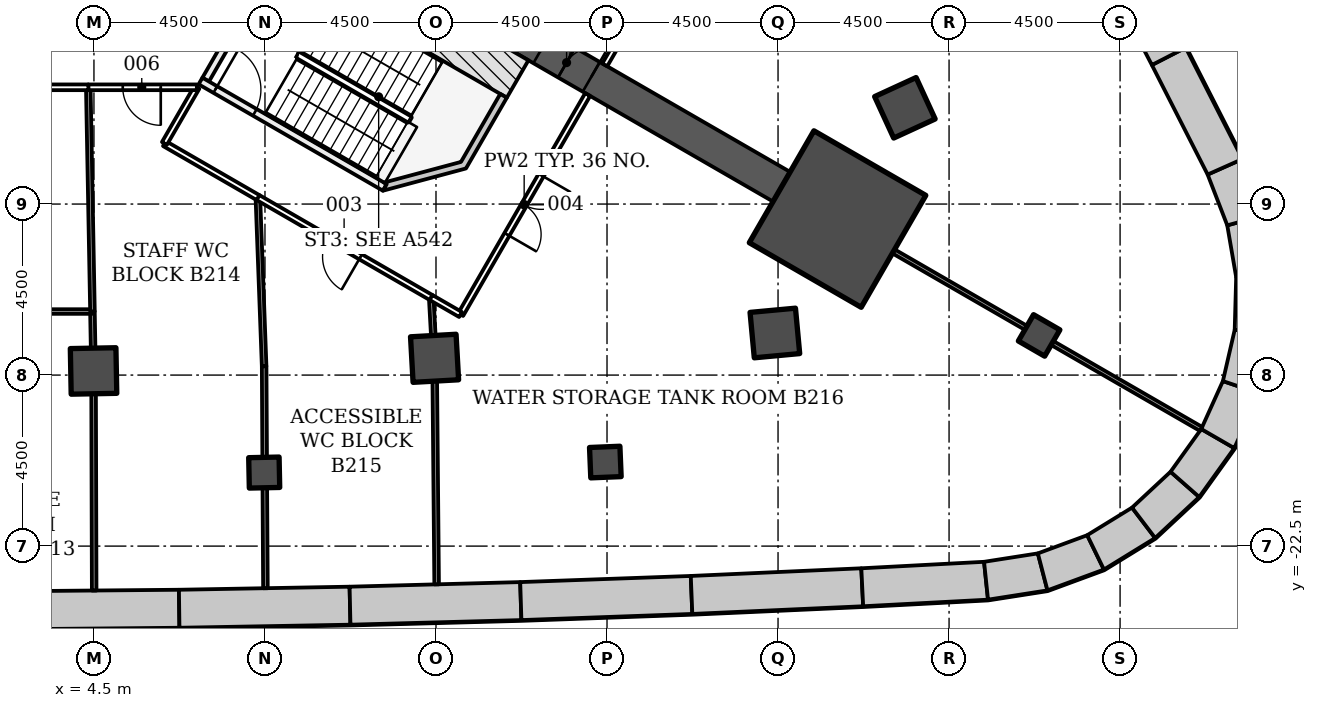
"""IFC4 building model, lengths in metres.
Left out: names, types, materials, properties, quantities, classifications, styles, units other than length and angle.
Written with IfcOpenShell. Run it as: python <this file> out.ifc"""

import sys

from ifc_helpers import new_model, si_unit, direction, frame, frame_2d, origin, origin_2d, place, context, subcontext, project, spatial, polyline, rectangle, outline, extrude, element, fill, save


model = new_model("IFC4")
c1 = context("Model", 3, precision=1e-05, world=origin(), true_north=direction((0.0, 1.0)))
c2 = subcontext(c1, "Body", "Model", "MODEL_VIEW")
j1 = project(units=[si_unit("LENGTHUNIT", "METRE"), si_unit("PLANEANGLEUNIT", "RADIAN")], contexts=[c1])
p1 = place(None, origin())
s1 = spatial("IfcSite", under=j1, at=p1, CompositionType="ELEMENT")
p2 = place(p1, origin())
s2 = spatial("IfcBuilding", under=s1, at=p2, CompositionType="ELEMENT")
p3 = place(p2, frame((0.0, 0.0, -9.0)))
s3 = spatial("IfcBuildingStorey", under=s2, at=p3, CompositionType="ELEMENT", Elevation=-9.0)
p4 = place(p3, origin())
e1 = element("IfcWall", 1, at=p4, inside=s3, PredefinedType="SOLIDWALL", context=c2, shape_type="SweptSolid", body=[
    extrude(outline(polyline([(2.25, -24.689), (6.75, -24.648), (6.736, -23.649), (2.246, -23.689), (2.25, -24.689)])), origin(), (0.0, 0.0, 1.0), 4.2),
])
p5 = place(p3, origin())
e2 = element("IfcWall", 2, at=p5, inside=s3, PredefinedType="SOLIDWALL", context=c2, shape_type="SweptSolid", body=[
    extrude(outline(polyline([(6.75, -24.648), (11.249, -24.568), (11.227, -23.568), (6.736, -23.649), (6.75, -24.648)])), origin(), (0.0, 0.0, 1.0), 4.2),
])
p6 = place(p3, origin())
e3 = element("IfcWall", 3, at=p6, inside=s3, PredefinedType="SOLIDWALL", context=c2, shape_type="SweptSolid", body=[
    extrude(outline(polyline([(11.249, -24.568), (15.747, -24.446), (15.716, -23.447), (11.227, -23.568), (11.249, -24.568)])), origin(), (0.0, 0.0, 1.0), 4.2),
])
p7 = place(p3, origin())
e4 = element("IfcWall", 4, at=p7, inside=s3, PredefinedType="SOLIDWALL", context=c2, shape_type="SweptSolid", body=[
    extrude(outline(polyline([(15.747, -24.446), (20.244, -24.285), (20.204, -23.285), (15.716, -23.447), (15.747, -24.446)])), origin(), (0.0, 0.0, 1.0), 4.2),
])
p8 = place(p3, origin())
e5 = element("IfcWall", 5, at=p8, inside=s3, PredefinedType="SOLIDWALL", context=c2, shape_type="SweptSolid", body=[
    extrude(outline(polyline([(20.244, -24.285), (24.74, -24.083), (24.691, -23.084), (20.204, -23.285), (20.244, -24.285)])), origin(), (0.0, 0.0, 1.0), 4.2),
])
p9 = place(p3, origin())
e6 = element("IfcWall", 6, at=p9, inside=s3, PredefinedType="SOLIDWALL", context=c2, shape_type="SweptSolid", body=[
    extrude(outline(polyline([(24.74, -24.083), (28.025, -23.909), (27.921, -22.913), (24.691, -23.084), (24.74, -24.083)])), origin(), (0.0, 0.0, 1.0), 4.2),
])
p10 = place(p3, origin())
e7 = element("IfcWall", 7, at=p10, inside=s3, PredefinedType="SOLIDWALL", context=c2, shape_type="SweptSolid", body=[
    extrude(outline(polyline([(28.025, -23.909), (29.589, -23.665), (29.337, -22.692), (27.921, -22.913), (28.025, -23.909)])), origin(), (0.0, 0.0, 1.0), 4.2),
])
p11 = place(p3, origin())
e8 = element("IfcWall", 8, at=p11, inside=s3, PredefinedType="SOLIDWALL", context=c2, shape_type="SweptSolid", body=[
    extrude(outline(polyline([(29.589, -23.665), (31.075, -23.117), (30.635, -22.213), (29.337, -22.692), (29.589, -23.665)])), origin(), (0.0, 0.0, 1.0), 4.2),
])
p12 = place(p3, origin())
e9 = element("IfcWall", 9, at=p12, inside=s3, PredefinedType="SOLIDWALL", context=c2, shape_type="SweptSolid", body=[
    extrude(outline(polyline([(31.075, -23.117), (32.423, -22.287), (31.815, -21.487), (30.635, -22.213), (31.075, -23.117)])), origin(), (0.0, 0.0, 1.0), 4.2),
])
p13 = place(p3, origin())
e10 = element("IfcWall", 10, at=p13, inside=s3, PredefinedType="SOLIDWALL", context=c2, shape_type="SweptSolid", body=[
    extrude(outline(polyline([(32.423, -22.287), (33.582, -21.208), (32.828, -20.544), (31.815, -21.487), (32.423, -22.287)])), origin(), (0.0, 0.0, 1.0), 4.2),
])
p14 = place(p3, origin())
e11 = element("IfcWall", 11, at=p14, inside=s3, PredefinedType="SOLIDWALL", context=c2, shape_type="SweptSolid", body=[
    extrude(outline(polyline([(33.582, -21.208), (34.506, -19.922), (33.635, -19.419), (32.828, -20.544), (33.582, -21.208)])), origin(), (0.0, 0.0, 1.0), 4.2),
])
p15 = place(p3, origin())
e12 = element("IfcWall", 12, at=p15, inside=s3, PredefinedType="SOLIDWALL", context=c2, shape_type="SweptSolid", body=[
    extrude(outline(polyline([(34.506, -19.922), (35.158, -18.479), (34.205, -18.158), (33.635, -19.419), (34.506, -19.922)])), origin(), (0.0, 0.0, 1.0), 4.2),
])
p16 = place(p3, origin())
e13 = element("IfcWall", 13, at=p16, inside=s3, PredefinedType="SOLIDWALL", context=c2, shape_type="SweptSolid", body=[
    extrude(outline(polyline([(35.158, -18.479), (35.513, -16.936), (34.516, -16.809), (34.205, -18.158), (35.158, -18.479)])), origin(), (0.0, 0.0, 1.0), 4.2),
])
p17 = place(p3, origin())
e14 = element("IfcWall", 14, at=p17, inside=s3, PredefinedType="SOLIDWALL", context=c2, shape_type="SweptSolid", body=[
    extrude(outline(polyline([(35.513, -16.936), (35.557, -15.353), (34.555, -15.425), (34.516, -16.809), (35.513, -16.936)])), origin(), (0.0, 0.0, 1.0), 4.2),
])
p18 = place(p3, origin())
e15 = element("IfcWall", 15, at=p18, inside=s3, PredefinedType="SOLIDWALL", context=c2, shape_type="SweptSolid", body=[
    extrude(outline(polyline([(35.557, -15.353), (35.289, -13.793), (34.32, -14.06), (34.555, -15.425), (35.557, -15.353)])), origin(), (0.0, 0.0, 1.0), 4.2),
])
p19 = place(p3, origin())
e16 = element("IfcWall", 16, at=p19, inside=s3, PredefinedType="SOLIDWALL", context=c2, shape_type="SweptSolid", body=[
    extrude(outline(polyline([(35.289, -13.793), (34.719, -12.316), (33.804, -12.724), (34.32, -14.06), (35.289, -13.793)])), origin(), (0.0, 0.0, 1.0), 4.2),
])
p20 = place(p3, origin())
e17 = element("IfcWall", 17, at=p20, inside=s3, PredefinedType="SOLIDWALL", context=c2, shape_type="SweptSolid", body=[
    extrude(outline(polyline([(34.719, -12.316), (33.226, -9.384), (32.337, -9.841), (33.804, -12.724), (34.719, -12.316)])), origin(), (0.0, 0.0, 1.0), 4.2),
])
p21 = place(p3, origin())
e18 = element("IfcWall", 18, at=p21, inside=s3, PredefinedType="SOLIDWALL", context=c2, shape_type="SweptSolid", body=[
    extrude(outline(polyline([(33.226, -9.384), (31.153, -5.39), (30.268, -5.854), (32.337, -9.841), (33.226, -9.384)])), origin(), (0.0, 0.0, 1.0), 4.2),
])
for number, where, z_axis, x_axis in (
    (19, (4.49, -17.892, -0.3), (0.0, 0.0, 1.0), (0.019, -1.0, 0.0)),
    (20, (13.462, -17.558, -0.3), (0.0, 0.0, 1.0), (0.056, -0.998, 0.0)),
    (21, (22.417, -16.893, -0.3), (0.0, 0.0, 1.0), (0.093, -0.996, 0.0)),
    (22, (25.838, -10.967, -0.3), (0.0, 0.0, 1.0), (0.909, 0.418, 0.0)),
):
    element("IfcColumn", number, at=place(p3, frame(where, z_axis=z_axis, x_axis=x_axis)), inside=s3, PredefinedType="COLUMN", context=c2, shape_type="SweptSolid", body=[
        extrude(rectangle(XDim=1.2, YDim=1.2, at=origin_2d()), origin(), (0.0, 0.0, 1.0), 4.5),
    ])
for number, where, z_axis, x_axis in (
    (23, (8.98, -20.565, -0.3), (0.0, 0.0, 1.0), (0.021, -1.0, 0.0)),
    (24, (17.956, -20.288, -0.3), (0.0, 0.0, 1.0), (0.041, -0.999, 0.0)),
    (25, (29.37, -16.957, -0.3), (0.0, 0.0, 1.0), (0.866, -0.5, 0.0)),
):
    element("IfcColumn", number, at=place(p3, frame(where, z_axis=z_axis, x_axis=x_axis)), inside=s3, PredefinedType="COLUMN", context=c2, shape_type="SweptSolid", body=[
        extrude(rectangle(XDim=0.8, YDim=0.8, at=origin_2d()), origin(), (0.0, 0.0, 1.0), 4.5),
    ])
p22 = place(p3, frame((9.922, -5.728, -0.3), z_axis=(0.0, 0.0, 1.0), x_axis=(0.866028046028, -0.499995423472, 0.0)))
e26 = element("IfcWall", 26, at=p22, inside=s3, PredefinedType="SHEAR", context=c2, shape_type="SweptSolid", body=[
    extrude(rectangle(XDim=14.633, YDim=0.9, at=frame_2d((7.316, 0.0))), origin(), (0.0, 0.0, 1.0), 4.5),
])
p23 = place(p22, frame((7.35, 0.0, 0.3)))
e27 = element("IfcOpeningElement", 27, at=p23, cuts=e26, PredefinedType="OPENING", context=c2, shape_type="SweptSolid", body=[
    extrude(rectangle(XDim=1.5, YDim=2.1, at=frame_2d((0.75, 1.05))), frame((0.0, 0.46, 0.0), z_axis=(0.0, -1.0, 0.0), x_axis=(1.0, 0.0, 0.0)), (0.0, 0.0, 1.0), 0.92),
])
p24 = place(p3, frame((24.066, -13.895, -0.3), z_axis=(0.0, 0.0, 1.0), x_axis=(0.866025403784, -0.5, 0.0)))
e28 = element("IfcColumn", 28, at=p24, inside=s3, PredefinedType="COLUMN", context=c2, shape_type="SweptSolid", body=[
    extrude(rectangle(XDim=3.4, YDim=3.4, at=origin_2d()), origin(), (0.0, 0.0, 1.0), 4.5),
])
p25 = place(p3, frame((7.44, -10.226, -0.3), z_axis=(0.0, 0.0, 1.0), x_axis=(0.500022077904, 0.866012656725, 0.0)))
e29 = element("IfcWall", 29, at=p25, inside=s3, PredefinedType="SHEAR", context=c2, shape_type="SweptSolid", body=[
    extrude(rectangle(XDim=3.55, YDim=0.2, at=frame_2d((1.775, 0.0))), origin(), (0.0, 0.0, 1.0), 4.5),
])
p26 = place(p25, frame((1.175, 0.0, 0.3)))
e30 = element("IfcOpeningElement", 30, at=p26, cuts=e29, PredefinedType="OPENING", context=c2, shape_type="SweptSolid", body=[
    extrude(rectangle(XDim=1.2, YDim=2.1, at=frame_2d((0.6, 1.05))), frame((0.0, 0.11, 0.0), z_axis=(0.0, -1.0, 0.0), x_axis=(1.0, 0.0, 0.0)), (0.0, 0.0, 1.0), 0.22),
])
p27 = place(p3, frame((7.304, -10.262, -0.3), z_axis=(0.0, 0.0, 1.0), x_axis=(0.866026594901, -0.49999793692, 0.0)))
e31 = element("IfcWall", 31, at=p27, inside=s3, PredefinedType="SHEAR", context=c2, shape_type="SweptSolid", body=[
    extrude(rectangle(XDim=5.6, YDim=0.2, at=frame_2d((2.8, 0.0))), origin(), (0.0, 0.0, 1.0), 4.5),
])
p28 = place(p27, frame((0.45, 0.0, 0.3)))
e32 = element("IfcOpeningElement", 32, at=p28, cuts=e31, PredefinedType="OPENING", context=c2, shape_type="SweptSolid", body=[
    extrude(rectangle(XDim=1.2, YDim=2.1, at=frame_2d((0.6, 1.05))), frame((0.0, 0.11, 0.0), z_axis=(0.0, -1.0, 0.0), x_axis=(1.0, 0.0, 0.0)), (0.0, 0.0, 1.0), 0.22),
])
p29 = place(p3, frame((9.413, -6.61, -0.3), z_axis=(0.0, 0.0, 1.0), x_axis=(0.866018442252, -0.500012057535, 0.0)))
e33 = element("IfcWall", 33, at=p29, inside=s3, PredefinedType="SHEAR", context=c2, shape_type="SweptSolid", body=[
    extrude(rectangle(XDim=7.2, YDim=1.136, at=frame_2d((3.6, 0.0))), origin(), (0.0, 0.0, 1.0), 4.5),
])
p30 = place(p3, frame((0.0, 0.0, -0.3)))
e34 = element("IfcWall", 34, at=p30, inside=s3, PredefinedType="SHEAR", context=c2, shape_type="SweptSolid", body=[
    extrude(outline(polyline([(12.104, -13.149), (14.289, -12.563), (15.364, -10.701), (15.191, -10.601), (14.157, -12.392), (12.132, -12.934), (12.204, -12.976), (12.204, -12.976), (12.204, -12.976), (12.204, -12.976), (12.204, -12.976), (12.204, -12.976), (12.204, -12.976), (12.204, -12.976), (12.204, -12.976), (12.204, -12.976), (12.204, -12.976), (12.204, -12.976), (12.204, -12.976), (12.204, -12.976), (12.204, -12.976), (12.204, -12.976), (12.204, -12.976), (12.104, -13.149)])), origin(), (0.0, 0.0, 1.0), 4.5),
])
p31 = place(p3, frame((4.478, -17.291, 0.0), z_axis=(0.0, 0.0, 1.0), x_axis=(-0.018678891577, 0.999825534286, 0.0)))
e35 = element("IfcWall", 35, at=p31, inside=s3, PredefinedType="PARTITIONING", context=c2, shape_type="SweptSolid", body=[
    extrude(rectangle(XDim=0.967, YDim=0.12, at=frame_2d((0.484, 0.0))), origin(), (0.0, 0.0, 1.0), 3.588),
])
p32 = place(p3, frame((4.506, -23.669, 0.0), z_axis=(0.0, 0.0, 1.0), x_axis=(-0.00292382622, 0.999995725611, 0.0)))
e36 = element("IfcWall", 36, at=p32, inside=s3, PredefinedType="PARTITIONING", context=c2, shape_type="SweptSolid", body=[
    extrude(rectangle(XDim=5.177, YDim=0.12, at=frame_2d((2.588, 0.0))), origin(), (0.0, 0.0, 1.0), 3.583),
])
p33 = place(p3, frame((4.461, -16.328, 0.0), z_axis=(0.0, 0.0, 1.0), x_axis=(-1.0, 0.0, 0.0)))
e37 = element("IfcWall", 37, at=p33, inside=s3, PredefinedType="PARTITIONING", context=c2, shape_type="SweptSolid", body=[
    extrude(rectangle(XDim=4.461, YDim=0.12, at=frame_2d((2.23, 0.0))), origin(), (0.0, 0.0, 1.0), 3.588),
])
p34 = place(p33, frame((1.75, 0.0, 0.0)))
e38 = element("IfcOpeningElement", 38, at=p34, cuts=e37, PredefinedType="OPENING", context=c2, shape_type="SweptSolid", body=[
    extrude(rectangle(XDim=1.0, YDim=2.1, at=frame_2d((0.5, 1.05))), frame((0.0, 0.07, 0.0), z_axis=(0.0, -1.0, 0.0), x_axis=(1.0, 0.0, 0.0)), (0.0, 0.0, 1.0), 0.14),
])
p35 = place(p3, frame((13.429, -16.959, 0.0), z_axis=(0.0, 0.0, 1.0), x_axis=(-0.055009625476, 0.998485824188, 0.0)))
e39 = element("IfcWall", 39, at=p35, inside=s3, PredefinedType="PARTITIONING", context=c2, shape_type="SweptSolid", body=[
    extrude(rectangle(XDim=0.999, YDim=0.12, at=frame_2d((0.499, 0.0))), origin(), (0.0, 0.0, 1.0), 3.588),
])
p36 = place(p3, frame((13.517, -23.506, 0.0), z_axis=(0.0, 0.0, 1.0), x_axis=(-0.00917685765, 0.999957891755, 0.0)))
e40 = element("IfcWall", 40, at=p36, inside=s3, PredefinedType="PARTITIONING", context=c2, shape_type="SweptSolid", body=[
    extrude(rectangle(XDim=5.347, YDim=0.12, at=frame_2d((2.674, 0.0))), origin(), (0.0, 0.0, 1.0), 3.583),
])
p37 = place(p3, frame((8.813, -13.328, 0.0), z_axis=(0.0, 0.0, 1.0), x_axis=(0.03715191714, -0.999309629221, 0.0)))
e41 = element("IfcWall", 41, at=p37, inside=s3, PredefinedType="PARTITIONING", context=c2, shape_type="SweptSolid", body=[
    extrude(rectangle(XDim=4.442, YDim=0.12, at=frame_2d((2.221, 0.0))), origin(), (0.0, 0.0, 1.0), 3.588),
])
p38 = place(p3, frame((8.978, -17.767, 0.0), z_axis=(0.0, 0.0, 1.0), x_axis=(0.005803200997, -0.999983161287, 0.0)))
e42 = element("IfcWall", 42, at=p38, inside=s3, PredefinedType="PARTITIONING", context=c2, shape_type="SweptSolid", body=[
    extrude(rectangle(XDim=2.398, YDim=0.12, at=frame_2d((1.199, 0.0))), origin(), (0.0, 0.0, 1.0), 3.588),
])
p39 = place(p3, frame((8.996, -20.965, 0.0), z_axis=(0.0, 0.0, 1.0), x_axis=(0.006004510691, -0.999981972763, 0.0)))
e43 = element("IfcWall", 43, at=p39, inside=s3, PredefinedType="PARTITIONING", context=c2, shape_type="SweptSolid", body=[
    extrude(rectangle(XDim=2.643, YDim=0.12, at=frame_2d((1.321, 0.0))), origin(), (0.0, 0.0, 1.0), 4.2),
])
p40 = place(p3, frame((13.377, -15.963, 0.0), z_axis=(0.0, 0.0, 1.0), x_axis=(-0.865969754012, 0.500096375847, 0.0)))
e44 = element("IfcWall", 44, at=p40, inside=s3, PredefinedType="PARTITIONING", context=c2, shape_type="SweptSolid", body=[
    extrude(rectangle(XDim=5.275, YDim=0.15, at=frame_2d((2.637, 0.0))), origin(), (0.0, 0.0, 1.0), 3.588),
])
p41 = place(p40, frame((2.15, 0.0, 0.0)))
e45 = element("IfcOpeningElement", 45, at=p41, cuts=e44, PredefinedType="OPENING", context=c2, shape_type="SweptSolid", body=[
    extrude(rectangle(XDim=1.0, YDim=2.1, at=frame_2d((0.5, 1.05))), frame((0.0, 0.085, 0.0), z_axis=(0.0, -1.0, 0.0), x_axis=(1.0, 0.0, 0.0)), (0.0, 0.0, 1.0), 0.17),
])
p42 = place(p3, frame((17.491, -10.618, 0.0), z_axis=(0.0, 0.0, 1.0), x_axis=(-0.499969057507, -0.866043267704, 0.0)))
e46 = element("IfcWall", 46, at=p42, inside=s3, PredefinedType="PARTITIONING", context=c2, shape_type="SweptSolid", body=[
    extrude(rectangle(XDim=6.685, YDim=0.15, at=frame_2d((3.342, 0.0))), origin(), (0.0, 0.0, 1.0), 3.588),
])
p43 = place(p42, frame((2.45, 0.0, 0.0)))
e47 = element("IfcOpeningElement", 47, at=p43, cuts=e46, PredefinedType="OPENING", context=c2, shape_type="SweptSolid", body=[
    extrude(rectangle(XDim=1.8, YDim=2.1, at=frame_2d((0.9, 1.05))), frame((0.0, 0.085, 0.0), z_axis=(0.0, -1.0, 0.0), x_axis=(1.0, 0.0, 0.0)), (0.0, 0.0, 1.0), 0.17),
])
p44 = place(p3, frame((14.147, -16.407, 0.0), z_axis=(0.0, 0.0, 1.0), x_axis=(-0.866276218641, 0.499565324075, 0.0)))
e48 = element("IfcWall", 48, at=p44, inside=s3, PredefinedType="PARTITIONING", context=c2, shape_type="SweptSolid", body=[
    extrude(rectangle(XDim=0.897, YDim=0.15, at=frame_2d((0.448, 0.0))), origin(), (0.0, 0.0, 1.0), 3.588),
])
p45 = place(p3, frame((29.023, -16.757, 0.0), z_axis=(0.0, 0.0, 1.0), x_axis=(-0.866027971625, 0.499995552344, 0.0)))
e49 = element("IfcWall", 49, at=p45, inside=s3, PredefinedType="PARTITIONING", context=c2, shape_type="SweptSolid", body=[
    extrude(rectangle(XDim=4.024, YDim=0.12, at=frame_2d((2.012, 0.0))), origin(), (0.0, 0.0, 1.0), 3.667),
])
p46 = place(p3, frame((33.634, -19.419, 0.0), z_axis=(0.0, 0.0, 1.0), x_axis=(-0.866032814021, 0.499987164874, 0.0)))
e50 = element("IfcWall", 50, at=p46, inside=s3, PredefinedType="PARTITIONING", context=c2, shape_type="SweptSolid", body=[
    extrude(rectangle(XDim=4.524, YDim=0.12, at=frame_2d((2.262, 0.0))), origin(), (0.0, 0.0, 1.0), 4.2),
])
p47 = place(p3, frame((4.351, -10.429, 0.0), z_axis=(0.0, 0.0, 1.0), x_axis=(0.018624139004, -0.999826555682, 0.0)))
e51 = element("IfcWall", 51, at=p47, inside=s3, PredefinedType="PARTITIONING", context=c2, shape_type="SweptSolid", body=[
    extrude(rectangle(XDim=5.899, YDim=0.12, at=frame_2d((2.949, 0.0))), origin(), (0.0, 0.0, 1.0), 3.588),
])
p48 = place(p3, frame((8.817, -13.33, 0.0), z_axis=(0.0, 0.0, 1.0), x_axis=(-0.865999736111, 0.50004445508, 0.0)))
e52 = element("IfcWall", 52, at=p48, inside=s3, PredefinedType="PARTITIONING", context=c2, shape_type="SweptSolid", body=[
    extrude(rectangle(XDim=2.844, YDim=0.15, at=frame_2d((1.422, 0.0))), origin(), (0.0, 0.0, 1.0), 3.588),
])
p49 = place(p3, frame((6.354, -11.906, 0.0), z_axis=(0.0, 0.0, 1.0), x_axis=(0.500539815233, 0.865713516913, 0.0)))
e53 = element("IfcWall", 53, at=p49, inside=s3, PredefinedType="PARTITIONING", context=c2, shape_type="SweptSolid", body=[
    extrude(rectangle(XDim=1.706, YDim=0.15, at=frame_2d((0.853, 0.0))), origin(), (0.0, 0.0, 1.0), 4.2),
])
p50 = place(p3, frame((7.208, -10.428, 0.0), z_axis=(0.0, 0.0, 1.0), x_axis=(-1.0, 0.0, 0.0)))
e54 = element("IfcWall", 54, at=p50, inside=s3, PredefinedType="PARTITIONING", context=c2, shape_type="SweptSolid", body=[
    extrude(rectangle(XDim=2.861, YDim=0.15, at=frame_2d((1.431, 0.0))), origin(), (0.0, 0.0, 1.0), 3.588),
])
p51 = place(p50, frame((0.95, 0.0, 0.0)))
e55 = element("IfcOpeningElement", 55, at=p51, cuts=e54, PredefinedType="OPENING", context=c2, shape_type="SweptSolid", body=[
    extrude(rectangle(XDim=1.0, YDim=2.1, at=frame_2d((0.5, 1.05))), frame((0.0, 0.085, 0.0), z_axis=(0.0, -1.0, 0.0), x_axis=(1.0, 0.0, 0.0)), (0.0, 0.0, 1.0), 0.17),
])
p52 = place(p3, frame((4.355, -10.428, 0.0), z_axis=(0.0, 0.0, 1.0), x_axis=(-1.0, 0.0, 0.0)))
e56 = element("IfcWall", 56, at=p52, inside=s3, PredefinedType="PARTITIONING", context=c2, shape_type="SweptSolid", body=[
    extrude(rectangle(XDim=4.359, YDim=0.15, at=frame_2d((2.179, 0.0))), origin(), (0.0, 0.0, 1.0), 3.588),
])
p53 = place(p52, frame((1.65, 0.0, 0.0)))
e57 = element("IfcOpeningElement", 57, at=p53, cuts=e56, PredefinedType="OPENING", context=c2, shape_type="SweptSolid", body=[
    extrude(rectangle(XDim=1.0, YDim=2.1, at=frame_2d((0.5, 1.05))), frame((0.0, 0.085, 0.0), z_axis=(0.0, -1.0, 0.0), x_axis=(1.0, 0.0, 0.0)), (0.0, 0.0, 1.0), 0.17),
])
p54 = place(p3, frame((18.84, -8.281, 0.0), z_axis=(0.0, 0.0, 1.0), x_axis=(-0.500126010714, -0.86595263924, 0.0)))
e58 = element("IfcWall", 58, at=p54, inside=s3, PredefinedType="PARTITIONING", context=c2, shape_type="SweptSolid", body=[
    extrude(rectangle(XDim=1.798, YDim=0.15, at=frame_2d((0.899, 0.0))), origin(), (0.0, 0.0, 1.0), 3.588),
])
p55 = place(p28, origin())
e59 = element("IfcDoor", 59, at=p55, inside=s3, OperationType="SINGLE_SWING_LEFT", PredefinedType="DOOR", context=c2, shape_type="SweptSolid", body=[
    extrude(rectangle(XDim=1.2, YDim=2.1, at=frame_2d((0.6, 1.05))), frame((0.0, 0.025, 0.0), z_axis=(0.0, -1.0, 0.0), x_axis=(1.0, 0.0, 0.0)), (0.0, 0.0, 1.0), 0.05),
])
fill(e32, e59)
p56 = place(p41, origin())
e60 = element("IfcDoor", 60, at=p56, inside=s3, OperationType="SINGLE_SWING_RIGHT", PredefinedType="DOOR", context=c2, shape_type="SweptSolid", body=[
    extrude(rectangle(XDim=1.0, YDim=2.1, at=frame_2d((0.5, 1.05))), frame((0.0, 0.025, 0.0), z_axis=(0.0, -1.0, 0.0), x_axis=(1.0, 0.0, 0.0)), (0.0, 0.0, 1.0), 0.05),
])
fill(e45, e60)
p57 = place(p43, origin())
e61 = element("IfcDoor", 61, at=p57, inside=s3, OperationType="DOUBLE_DOOR_SINGLE_SWING", PredefinedType="DOOR", context=c2, shape_type="SweptSolid", body=[
    extrude(rectangle(XDim=1.8, YDim=2.1, at=frame_2d((0.9, 1.05))), frame((0.0, 0.025, 0.0), z_axis=(0.0, -1.0, 0.0), x_axis=(1.0, 0.0, 0.0)), (0.0, 0.0, 1.0), 0.05),
])
fill(e47, e61)
p58 = place(p51, origin())
e62 = element("IfcDoor", 62, at=p58, inside=s3, OperationType="SINGLE_SWING_RIGHT", PredefinedType="DOOR", context=c2, shape_type="SweptSolid", body=[
    extrude(rectangle(XDim=1.0, YDim=2.1, at=frame_2d((0.5, 1.05))), frame((0.0, 0.025, 0.0), z_axis=(0.0, -1.0, 0.0), x_axis=(1.0, 0.0, 0.0)), (0.0, 0.0, 1.0), 0.05),
])
fill(e55, e62)
p59 = place(p23, origin())
e63 = element("IfcDoor", 63, at=p59, inside=s3, OperationType="DOUBLE_DOOR_SINGLE_SWING", PredefinedType="DOOR", context=c2, shape_type="SweptSolid", body=[
    extrude(rectangle(XDim=1.5, YDim=2.1, at=frame_2d((0.75, 1.05))), frame((0.0, 0.025, 0.0), z_axis=(0.0, -1.0, 0.0), x_axis=(1.0, 0.0, 0.0)), (0.0, 0.0, 1.0), 0.05),
])
fill(e27, e63)
save(model, sys.argv[1])
